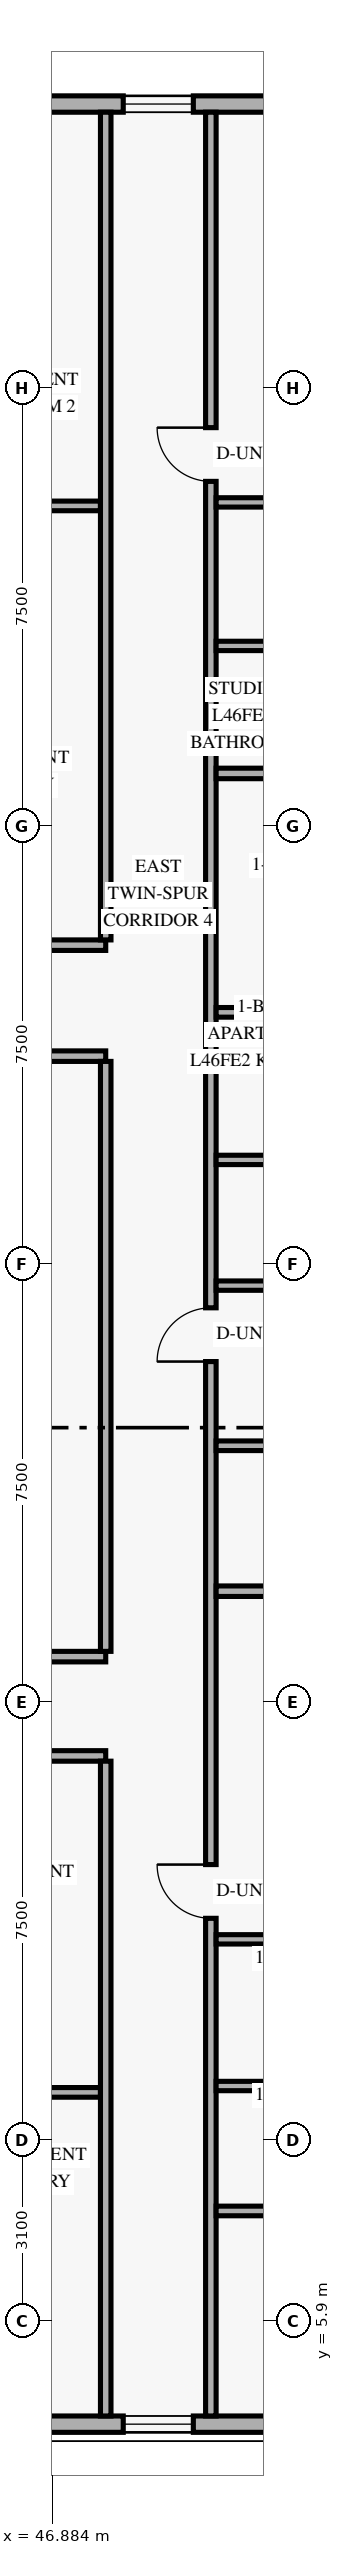
"""IFC4 building model, lengths in metres.
Left out: names, types, materials, properties, quantities, classifications, styles, units other than length and angle.
Written with IfcOpenShell. Run it as: python <this file> out.ifc"""

import sys

from ifc_helpers import new_model, si_unit, direction, frame, frame_2d, origin, place, context, subcontext, project, spatial, rectangle, extrude, element, fill, save


model = new_model("IFC4")
c1 = context("Model", 3, precision=1e-05, world=origin(), true_north=direction((0.0, 1.0)))
c2 = subcontext(c1, "Body", "Model", "MODEL_VIEW")
j1 = project(units=[si_unit("LENGTHUNIT", "METRE"), si_unit("PLANEANGLEUNIT", "RADIAN")], contexts=[c1])
p1 = place(None, origin())
s1 = spatial("IfcSite", under=j1, at=p1, CompositionType="ELEMENT")
p2 = place(p1, origin())
s2 = spatial("IfcBuilding", under=s1, at=p2, CompositionType="ELEMENT")
p3 = place(p2, frame((0.0, 0.0, 177.6)))
s3 = spatial("IfcBuildingStorey", under=s2, at=p3, CompositionType="ELEMENT", Elevation=177.6)
p4 = place(p3, frame((21.22, 4.14, 0.0), z_axis=(0.0, 0.0, 1.0), x_axis=(1.0, 0.0, 0.0)))
e1 = element("IfcWall", 1, at=p4, inside=s3, PredefinedType="SOLIDWALL", context=c2, shape_type="SweptSolid", body=[
    extrude(rectangle(XDim=33.76, YDim=0.28, at=frame_2d((16.88, 0.0))), origin(), (0.0, 0.0, 1.0), 3.36),
])
p5 = place(p4, frame((2.205, 0.0, 0.85)))
e2 = element("IfcOpeningElement", 2, at=p5, cuts=e1, PredefinedType="OPENING", context=c2, shape_type="SweptSolid", body=[
    extrude(rectangle(XDim=1.2, YDim=1.5, at=frame_2d((0.6, 0.75))), frame((0.0, 0.15, 0.0), z_axis=(0.0, -1.0, 0.0), x_axis=(1.0, 0.0, 0.0)), (0.0, 0.0, 1.0), 0.3),
])
p6 = place(p4, frame((9.09, 0.0, 0.85)))
e3 = element("IfcOpeningElement", 3, at=p6, cuts=e1, PredefinedType="OPENING", context=c2, shape_type="SweptSolid", body=[
    extrude(rectangle(XDim=1.2, YDim=1.5, at=frame_2d((0.6, 0.75))), frame((0.0, 0.15, 0.0), z_axis=(0.0, -1.0, 0.0), x_axis=(1.0, 0.0, 0.0)), (0.0, 0.0, 1.0), 0.3),
])
p7 = place(p4, frame((14.665, 0.0, 0.85)))
e4 = element("IfcOpeningElement", 4, at=p7, cuts=e1, PredefinedType="OPENING", context=c2, shape_type="SweptSolid", body=[
    extrude(rectangle(XDim=1.2, YDim=1.5, at=frame_2d((0.6, 0.75))), frame((0.0, 0.15, 0.0), z_axis=(0.0, -1.0, 0.0), x_axis=(1.0, 0.0, 0.0)), (0.0, 0.0, 1.0), 0.3),
])
p8 = place(p4, frame((18.825, 0.0, 0.85)))
e5 = element("IfcOpeningElement", 5, at=p8, cuts=e1, PredefinedType="OPENING", context=c2, shape_type="SweptSolid", body=[
    extrude(rectangle(XDim=1.2, YDim=1.5, at=frame_2d((0.6, 0.75))), frame((0.0, 0.15, 0.0), z_axis=(0.0, -1.0, 0.0), x_axis=(1.0, 0.0, 0.0)), (0.0, 0.0, 1.0), 0.3),
])
p9 = place(p4, frame((23.95, 0.0, 0.85)))
e6 = element("IfcOpeningElement", 6, at=p9, cuts=e1, PredefinedType="OPENING", context=c2, shape_type="SweptSolid", body=[
    extrude(rectangle(XDim=1.2, YDim=1.5, at=frame_2d((0.6, 0.75))), frame((0.0, 0.15, 0.0), z_axis=(0.0, -1.0, 0.0), x_axis=(1.0, 0.0, 0.0)), (0.0, 0.0, 1.0), 0.3),
])
p10 = place(p4, frame((26.88, 0.0, 0.85)))
e7 = element("IfcOpeningElement", 7, at=p10, cuts=e1, PredefinedType="OPENING", context=c2, shape_type="SweptSolid", body=[
    extrude(rectangle(XDim=1.2, YDim=1.5, at=frame_2d((0.6, 0.75))), frame((0.0, 0.15, 0.0), z_axis=(0.0, -1.0, 0.0), x_axis=(1.0, 0.0, 0.0)), (0.0, 0.0, 1.0), 0.3),
])
p11 = place(p4, frame((30.47, 0.0, 0.85)))
e8 = element("IfcOpeningElement", 8, at=p11, cuts=e1, PredefinedType="OPENING", context=c2, shape_type="SweptSolid", body=[
    extrude(rectangle(XDim=1.2, YDim=1.5, at=frame_2d((0.6, 0.75))), frame((0.0, 0.15, 0.0), z_axis=(0.0, -1.0, 0.0), x_axis=(1.0, 0.0, 0.0)), (0.0, 0.0, 1.0), 0.3),
])
p12 = place(p3, frame((54.98, 43.86, 0.0), z_axis=(0.0, 0.0, 1.0), x_axis=(-1.0, 0.0, 0.0)))
e9 = element("IfcWall", 9, at=p12, inside=s3, PredefinedType="SOLIDWALL", context=c2, shape_type="SweptSolid", body=[
    extrude(rectangle(XDim=33.76, YDim=0.28, at=frame_2d((16.88, 0.0))), origin(), (0.0, 0.0, 1.0), 3.36),
])
p13 = place(p12, frame((28.355, 0.0, 0.85)))
e10 = element("IfcOpeningElement", 10, at=p13, cuts=e9, PredefinedType="OPENING", context=c2, shape_type="SweptSolid", body=[
    extrude(rectangle(XDim=1.2, YDim=1.5, at=frame_2d((0.6, 0.75))), frame((0.0, 0.15, 0.0), z_axis=(0.0, -1.0, 0.0), x_axis=(1.0, 0.0, 0.0)), (0.0, 0.0, 1.0), 0.3),
])
p14 = place(p12, frame((21.47, 0.0, 0.85)))
e11 = element("IfcOpeningElement", 11, at=p14, cuts=e9, PredefinedType="OPENING", context=c2, shape_type="SweptSolid", body=[
    extrude(rectangle(XDim=1.2, YDim=1.5, at=frame_2d((0.6, 0.75))), frame((0.0, 0.15, 0.0), z_axis=(0.0, -1.0, 0.0), x_axis=(1.0, 0.0, 0.0)), (0.0, 0.0, 1.0), 0.3),
])
p15 = place(p12, frame((17.74, 0.0, 0.85)))
e12 = element("IfcOpeningElement", 12, at=p15, cuts=e9, PredefinedType="OPENING", context=c2, shape_type="SweptSolid", body=[
    extrude(rectangle(XDim=1.2, YDim=1.5, at=frame_2d((0.6, 0.75))), frame((0.0, 0.15, 0.0), z_axis=(0.0, -1.0, 0.0), x_axis=(1.0, 0.0, 0.0)), (0.0, 0.0, 1.0), 0.3),
])
p16 = place(p12, frame((13.62, 0.0, 0.85)))
e13 = element("IfcOpeningElement", 13, at=p16, cuts=e9, PredefinedType="OPENING", context=c2, shape_type="SweptSolid", body=[
    extrude(rectangle(XDim=1.2, YDim=1.5, at=frame_2d((0.6, 0.75))), frame((0.0, 0.15, 0.0), z_axis=(0.0, -1.0, 0.0), x_axis=(1.0, 0.0, 0.0)), (0.0, 0.0, 1.0), 0.3),
])
p17 = place(p12, frame((8.65, 0.0, 0.85)))
e14 = element("IfcOpeningElement", 14, at=p17, cuts=e9, PredefinedType="OPENING", context=c2, shape_type="SweptSolid", body=[
    extrude(rectangle(XDim=1.2, YDim=1.5, at=frame_2d((0.6, 0.75))), frame((0.0, 0.15, 0.0), z_axis=(0.0, -1.0, 0.0), x_axis=(1.0, 0.0, 0.0)), (0.0, 0.0, 1.0), 0.3),
])
p18 = place(p12, frame((5.68, 0.0, 0.85)))
e15 = element("IfcOpeningElement", 15, at=p18, cuts=e9, PredefinedType="OPENING", context=c2, shape_type="SweptSolid", body=[
    extrude(rectangle(XDim=1.2, YDim=1.5, at=frame_2d((0.6, 0.75))), frame((0.0, 0.15, 0.0), z_axis=(0.0, -1.0, 0.0), x_axis=(1.0, 0.0, 0.0)), (0.0, 0.0, 1.0), 0.3),
])
p19 = place(p12, frame((2.09, 0.0, 0.85)))
e16 = element("IfcOpeningElement", 16, at=p19, cuts=e9, PredefinedType="OPENING", context=c2, shape_type="SweptSolid", body=[
    extrude(rectangle(XDim=1.2, YDim=1.5, at=frame_2d((0.6, 0.75))), frame((0.0, 0.15, 0.0), z_axis=(0.0, -1.0, 0.0), x_axis=(1.0, 0.0, 0.0)), (0.0, 0.0, 1.0), 0.3),
])
p20 = place(p3, frame((37.633, 15.58, 0.0), z_axis=(0.0, 0.0, 1.0), x_axis=(1.0, 0.0, 0.0)))
e17 = element("IfcWall", 17, at=p20, inside=s3, PredefinedType="STANDARD", context=c2, shape_type="SweptSolid", body=[
    extrude(rectangle(XDim=10.167, YDim=0.18, at=frame_2d((5.084, 0.0))), origin(), (0.0, 0.0, 1.0), 2.73),
])
p21 = place(p20, frame((0.327, 0.0, 0.0)))
e18 = element("IfcOpeningElement", 18, at=p21, cuts=e17, PredefinedType="OPENING", context=c2, shape_type="SweptSolid", body=[
    extrude(rectangle(XDim=0.92, YDim=2.15, at=frame_2d((0.46, 1.075))), frame((0.0, 0.1, 0.0), z_axis=(0.0, -1.0, 0.0), x_axis=(1.0, 0.0, 0.0)), (0.0, 0.0, 1.0), 0.2),
])
p22 = place(p3, frame((37.64, 17.28, 0.0), z_axis=(0.0, 0.0, 1.0), x_axis=(1.0, 0.0, 0.0)))
e19 = element("IfcWall", 19, at=p22, inside=s3, PredefinedType="STANDARD", context=c2, shape_type="SweptSolid", body=[
    extrude(rectangle(XDim=10.16, YDim=0.18, at=frame_2d((5.08, 0.0))), origin(), (0.0, 0.0, 1.0), 2.73),
])
p23 = place(p22, frame((6.998, 0.0, 0.0)))
e20 = element("IfcOpeningElement", 20, at=p23, cuts=e19, PredefinedType="OPENING", context=c2, shape_type="SweptSolid", body=[
    extrude(rectangle(XDim=0.92, YDim=2.15, at=frame_2d((0.46, 1.075))), frame((0.0, 0.1, 0.0), z_axis=(0.0, -1.0, 0.0), x_axis=(1.0, 0.0, 0.0)), (0.0, 0.0, 1.0), 0.2),
])
p24 = place(p3, frame((37.64, 27.56, 0.0), z_axis=(0.0, 0.0, 1.0), x_axis=(1.0, 0.0, 0.0)))
e21 = element("IfcWall", 21, at=p24, inside=s3, PredefinedType="STANDARD", context=c2, shape_type="SweptSolid", body=[
    extrude(rectangle(XDim=10.16, YDim=0.18, at=frame_2d((5.08, 0.0))), origin(), (0.0, 0.0, 1.0), 2.73),
])
p25 = place(p3, frame((35.51, 29.46, 0.0), z_axis=(0.0, 0.0, 1.0), x_axis=(1.0, 0.0, 0.0)))
e22 = element("IfcWall", 22, at=p25, inside=s3, PredefinedType="STANDARD", context=c2, shape_type="SweptSolid", body=[
    extrude(rectangle(XDim=12.29, YDim=0.18, at=frame_2d((6.145, 0.0))), origin(), (0.0, 0.0, 1.0), 2.73),
])
p26 = place(p25, frame((0.32, 0.0, 0.0)))
e23 = element("IfcOpeningElement", 23, at=p26, cuts=e22, PredefinedType="OPENING", context=c2, shape_type="SweptSolid", body=[
    extrude(rectangle(XDim=0.92, YDim=2.15, at=frame_2d((0.46, 1.075))), frame((0.0, 0.1, 0.0), z_axis=(0.0, -1.0, 0.0), x_axis=(1.0, 0.0, 0.0)), (0.0, 0.0, 1.0), 0.2),
])
p27 = place(p3, frame((43.82, 9.82, 0.0), z_axis=(0.0, 0.0, 1.0), x_axis=(1.0, 0.0, 0.0)))
e24 = element("IfcWall", 24, at=p27, inside=s3, PredefinedType="PARTITIONING", context=c2, shape_type="SweptSolid", body=[
    extrude(rectangle(XDim=3.89, YDim=0.165, at=frame_2d((1.945, 0.0))), origin(), (0.0, 0.0, 1.0), 2.73),
])
p28 = place(p3, frame((43.74, 36.98, 0.0), z_axis=(0.0, 0.0, 1.0), x_axis=(1.0, 0.0, 0.0)))
e25 = element("IfcWall", 25, at=p28, inside=s3, PredefinedType="PARTITIONING", context=c2, shape_type="SweptSolid", body=[
    extrude(rectangle(XDim=3.97, YDim=0.165, at=frame_2d((1.985, 0.0))), origin(), (0.0, 0.0, 1.0), 2.73),
])
p29 = place(p3, frame((49.6, 4.28, 0.0), z_axis=(0.0, 0.0, 1.0), x_axis=(0.0, 1.0, 0.0)))
e26 = element("IfcWall", 26, at=p29, inside=s3, PredefinedType="STANDARD", context=c2, shape_type="SweptSolid", body=[
    extrude(rectangle(XDim=39.44, YDim=0.18, at=frame_2d((19.72, 0.0))), origin(), (0.0, 0.0, 1.0), 2.73),
])
p30 = place(p29, frame((8.52, 0.0, 0.0)))
e27 = element("IfcOpeningElement", 27, at=p30, cuts=e26, PredefinedType="OPENING", context=c2, shape_type="SweptSolid", body=[
    extrude(rectangle(XDim=0.92, YDim=2.15, at=frame_2d((0.46, 1.075))), frame((0.0, 0.1, 0.0), z_axis=(0.0, -1.0, 0.0), x_axis=(1.0, 0.0, 0.0)), (0.0, 0.0, 1.0), 0.2),
])
p31 = place(p29, frame((18.052, 0.0, 0.0)))
e28 = element("IfcOpeningElement", 28, at=p31, cuts=e26, PredefinedType="OPENING", context=c2, shape_type="SweptSolid", body=[
    extrude(rectangle(XDim=0.92, YDim=2.15, at=frame_2d((0.46, 1.075))), frame((0.0, 0.1, 0.0), z_axis=(0.0, -1.0, 0.0), x_axis=(1.0, 0.0, 0.0)), (0.0, 0.0, 1.0), 0.2),
])
p32 = place(p29, frame((33.12, 0.0, 0.0)))
e29 = element("IfcOpeningElement", 29, at=p32, cuts=e26, PredefinedType="OPENING", context=c2, shape_type="SweptSolid", body=[
    extrude(rectangle(XDim=0.92, YDim=2.15, at=frame_2d((0.46, 1.075))), frame((0.0, 0.1, 0.0), z_axis=(0.0, -1.0, 0.0), x_axis=(1.0, 0.0, 0.0)), (0.0, 0.0, 1.0), 0.2),
])
p33 = place(p3, frame((47.8, 4.28, 0.0), z_axis=(0.0, 0.0, 1.0), x_axis=(0.0, 1.0, 0.0)))
e30 = element("IfcWall", 30, at=p33, inside=s3, PredefinedType="STANDARD", context=c2, shape_type="SweptSolid", body=[
    extrude(rectangle(XDim=11.21, YDim=0.18, at=frame_2d((5.605, 0.0))), origin(), (0.0, 0.0, 1.0), 2.73),
])
p34 = place(p3, frame((47.8, 17.37, 0.0), z_axis=(0.0, 0.0, 1.0), x_axis=(0.0, 1.0, 0.0)))
e31 = element("IfcWall", 31, at=p34, inside=s3, PredefinedType="STANDARD", context=c2, shape_type="SweptSolid", body=[
    extrude(rectangle(XDim=10.1, YDim=0.18, at=frame_2d((5.05, 0.0))), origin(), (0.0, 0.0, 1.0), 2.73),
])
p35 = place(p3, frame((47.8, 29.55, 0.0), z_axis=(0.0, 0.0, 1.0), x_axis=(0.0, 1.0, 0.0)))
e32 = element("IfcWall", 32, at=p35, inside=s3, PredefinedType="STANDARD", context=c2, shape_type="SweptSolid", body=[
    extrude(rectangle(XDim=14.17, YDim=0.18, at=frame_2d((7.085, 0.0))), origin(), (0.0, 0.0, 1.0), 2.73),
])
p36 = place(p3, frame((49.69, 7.79, 0.0), z_axis=(0.0, 0.0, 1.0), x_axis=(1.0, 0.0, 0.0)))
e33 = element("IfcWall", 33, at=p36, inside=s3, PredefinedType="PARTITIONING", context=c2, shape_type="SweptSolid", body=[
    extrude(rectangle(XDim=8.63, YDim=0.165, at=frame_2d((4.315, 0.0))), origin(), (0.0, 0.0, 1.0), 2.879),
])
p37 = place(p36, frame((6.736, 0.0, 0.0)))
e34 = element("IfcOpeningElement", 34, at=p37, cuts=e33, PredefinedType="OPENING", context=c2, shape_type="SweptSolid", body=[
    extrude(rectangle(XDim=0.9, YDim=2.14, at=frame_2d((0.45, 1.07))), frame((0.0, 0.093, 0.0), z_axis=(0.0, -1.0, 0.0), x_axis=(1.0, 0.0, 0.0)), (0.0, 0.0, 1.0), 0.185),
])
p38 = place(p3, frame((49.69, 12.44, 0.0), z_axis=(0.0, 0.0, 1.0), x_axis=(1.0, 0.0, 0.0)))
e35 = element("IfcWall", 35, at=p38, inside=s3, PredefinedType="PLUMBINGWALL", context=c2, shape_type="SweptSolid", body=[
    extrude(rectangle(XDim=5.511, YDim=0.16, at=frame_2d((2.756, 0.0))), origin(), (0.0, 0.0, 1.0), 2.879),
])
p39 = place(p3, frame((49.69, 9.929, 0.0), z_axis=(0.0, 0.0, 1.0), x_axis=(1.0, 0.0, 0.0)))
e36 = element("IfcWall", 36, at=p39, inside=s3, PredefinedType="PLUMBINGWALL", context=c2, shape_type="SweptSolid", body=[
    extrude(rectangle(XDim=5.351, YDim=0.16, at=frame_2d((2.676, 0.0))), origin(), (0.0, 0.0, 1.0), 2.879),
])
p40 = place(p3, frame((49.69, 18.4, 0.0), z_axis=(0.0, 0.0, 1.0), x_axis=(1.0, 0.0, 0.0)))
e37 = element("IfcWall", 37, at=p40, inside=s3, PredefinedType="PARTITIONING", context=c2, shape_type="SweptSolid", body=[
    extrude(rectangle(XDim=8.63, YDim=0.18, at=frame_2d((4.315, 0.0))), origin(), (0.0, 0.0, 1.0), 2.879),
])
p41 = place(p3, frame((49.69, 28.31, 0.0), z_axis=(0.0, 0.0, 1.0), x_axis=(1.0, 0.0, 0.0)))
e38 = element("IfcWall", 38, at=p41, inside=s3, PredefinedType="PARTITIONING", context=c2, shape_type="SweptSolid", body=[
    extrude(rectangle(XDim=8.63, YDim=0.165, at=frame_2d((4.315, 0.0))), origin(), (0.0, 0.0, 1.0), 2.879),
])
p42 = place(p41, frame((2.796, 0.0, 0.0)))
e39 = element("IfcOpeningElement", 39, at=p42, cuts=e38, PredefinedType="OPENING", context=c2, shape_type="SweptSolid", body=[
    extrude(rectangle(XDim=0.88, YDim=2.12, at=frame_2d((0.44, 1.06))), frame((0.0, 0.093, 0.0), z_axis=(0.0, -1.0, 0.0), x_axis=(1.0, 0.0, 0.0)), (0.0, 0.0, 1.0), 0.185),
])
p43 = place(p41, frame((5.946, 0.0, 0.0)))
e40 = element("IfcOpeningElement", 40, at=p43, cuts=e38, PredefinedType="OPENING", context=c2, shape_type="SweptSolid", body=[
    extrude(rectangle(XDim=0.9, YDim=2.14, at=frame_2d((0.45, 1.07))), frame((0.0, 0.093, 0.0), z_axis=(0.0, -1.0, 0.0), x_axis=(1.0, 0.0, 0.0)), (0.0, 0.0, 1.0), 0.185),
])
p44 = place(p3, frame((49.69, 23.632, 0.0), z_axis=(0.0, 0.0, 1.0), x_axis=(1.0, 0.0, 0.0)))
e41 = element("IfcWall", 41, at=p44, inside=s3, PredefinedType="PLUMBINGWALL", context=c2, shape_type="SweptSolid", body=[
    extrude(rectangle(XDim=2.636, YDim=0.16, at=frame_2d((1.318, 0.0))), origin(), (0.0, 0.0, 1.0), 3.36),
])
p45 = place(p3, frame((49.69, 25.784, 0.0), z_axis=(0.0, 0.0, 1.0), x_axis=(1.0, 0.0, 0.0)))
e42 = element("IfcWall", 42, at=p45, inside=s3, PredefinedType="PLUMBINGWALL", context=c2, shape_type="SweptSolid", body=[
    extrude(rectangle(XDim=2.476, YDim=0.16, at=frame_2d((1.238, 0.0))), origin(), (0.0, 0.0, 1.0), 3.36),
])
p46 = place(p3, frame((49.69, 20.89, 0.0), z_axis=(0.0, 0.0, 1.0), x_axis=(1.0, 0.0, 0.0)))
e43 = element("IfcWall", 43, at=p46, inside=s3, PredefinedType="PARTITIONING", context=c2, shape_type="SweptSolid", body=[
    extrude(rectangle(XDim=8.63, YDim=0.165, at=frame_2d((4.315, 0.0))), origin(), (0.0, 0.0, 1.0), 2.879),
])
p47 = place(p46, frame((4.29, 0.0, 0.0)))
e44 = element("IfcOpeningElement", 44, at=p47, cuts=e43, PredefinedType="OPENING", context=c2, shape_type="SweptSolid", body=[
    extrude(rectangle(XDim=0.95, YDim=2.15, at=frame_2d((0.475, 1.075))), frame((0.0, 0.093, 0.0), z_axis=(0.0, -1.0, 0.0), x_axis=(1.0, 0.0, 0.0)), (0.0, 0.0, 1.0), 0.185),
])
p48 = place(p3, frame((49.69, 32.4, 0.0), z_axis=(0.0, 0.0, 1.0), x_axis=(1.0, 0.0, 0.0)))
e45 = element("IfcWall", 45, at=p48, inside=s3, PredefinedType="PARTITIONING", context=c2, shape_type="SweptSolid", body=[
    extrude(rectangle(XDim=8.63, YDim=0.18, at=frame_2d((4.315, 0.0))), origin(), (0.0, 0.0, 1.0), 2.879),
])
p49 = place(p3, frame((49.69, 37.04, 0.0), z_axis=(0.0, 0.0, 1.0), x_axis=(1.0, 0.0, 0.0)))
e46 = element("IfcWall", 46, at=p49, inside=s3, PredefinedType="PLUMBINGWALL", context=c2, shape_type="SweptSolid", body=[
    extrude(rectangle(XDim=2.682, YDim=0.16, at=frame_2d((1.341, 0.0))), origin(), (0.0, 0.0, 1.0), 3.36),
])
p50 = place(p3, frame((49.69, 34.583, 0.0), z_axis=(0.0, 0.0, 1.0), x_axis=(1.0, 0.0, 0.0)))
e47 = element("IfcWall", 47, at=p50, inside=s3, PredefinedType="PLUMBINGWALL", context=c2, shape_type="SweptSolid", body=[
    extrude(rectangle(XDim=2.522, YDim=0.16, at=frame_2d((1.261, 0.0))), origin(), (0.0, 0.0, 1.0), 2.984),
])
p51 = place(p10, origin())
e48 = element("IfcWindow", 48, at=p51, inside=s3, PartitioningType="SINGLE_PANEL", PredefinedType="WINDOW", context=c2, shape_type="SweptSolid", body=[
    extrude(rectangle(XDim=1.2, YDim=1.5, at=frame_2d((0.6, 0.75))), frame((0.0, 0.03, 0.0), z_axis=(0.0, -1.0, 0.0), x_axis=(1.0, 0.0, 0.0)), (0.0, 0.0, 1.0), 0.06),
])
fill(e7, e48)
p52 = place(p18, origin())
e49 = element("IfcWindow", 49, at=p52, inside=s3, PartitioningType="SINGLE_PANEL", PredefinedType="WINDOW", context=c2, shape_type="SweptSolid", body=[
    extrude(rectangle(XDim=1.2, YDim=1.5, at=frame_2d((0.6, 0.75))), frame((0.0, 0.03, 0.0), z_axis=(0.0, -1.0, 0.0), x_axis=(1.0, 0.0, 0.0)), (0.0, 0.0, 1.0), 0.06),
])
fill(e15, e49)
p53 = place(p30, origin())
e50 = element("IfcDoor", 50, at=p53, inside=s3, OperationType="SINGLE_SWING_RIGHT", PredefinedType="DOOR", context=c2, shape_type="SweptSolid", body=[
    extrude(rectangle(XDim=0.92, YDim=2.15, at=frame_2d((0.46, 1.075))), frame((0.0, 0.025, 0.0), z_axis=(0.0, -1.0, 0.0), x_axis=(1.0, 0.0, 0.0)), (0.0, 0.0, 1.0), 0.05),
])
fill(e27, e50)
p54 = place(p31, origin())
e51 = element("IfcDoor", 51, at=p54, inside=s3, OperationType="SINGLE_SWING_LEFT", PredefinedType="DOOR", context=c2, shape_type="SweptSolid", body=[
    extrude(rectangle(XDim=0.92, YDim=2.15, at=frame_2d((0.46, 1.075))), frame((0.0, 0.025, 0.0), z_axis=(0.0, -1.0, 0.0), x_axis=(1.0, 0.0, 0.0)), (0.0, 0.0, 1.0), 0.05),
])
fill(e28, e51)
p55 = place(p32, origin())
e52 = element("IfcDoor", 52, at=p55, inside=s3, OperationType="SINGLE_SWING_RIGHT", PredefinedType="DOOR", context=c2, shape_type="SweptSolid", body=[
    extrude(rectangle(XDim=0.92, YDim=2.15, at=frame_2d((0.46, 1.075))), frame((0.0, 0.025, 0.0), z_axis=(0.0, -1.0, 0.0), x_axis=(1.0, 0.0, 0.0)), (0.0, 0.0, 1.0), 0.05),
])
fill(e29, e52)
save(model, sys.argv[1])
